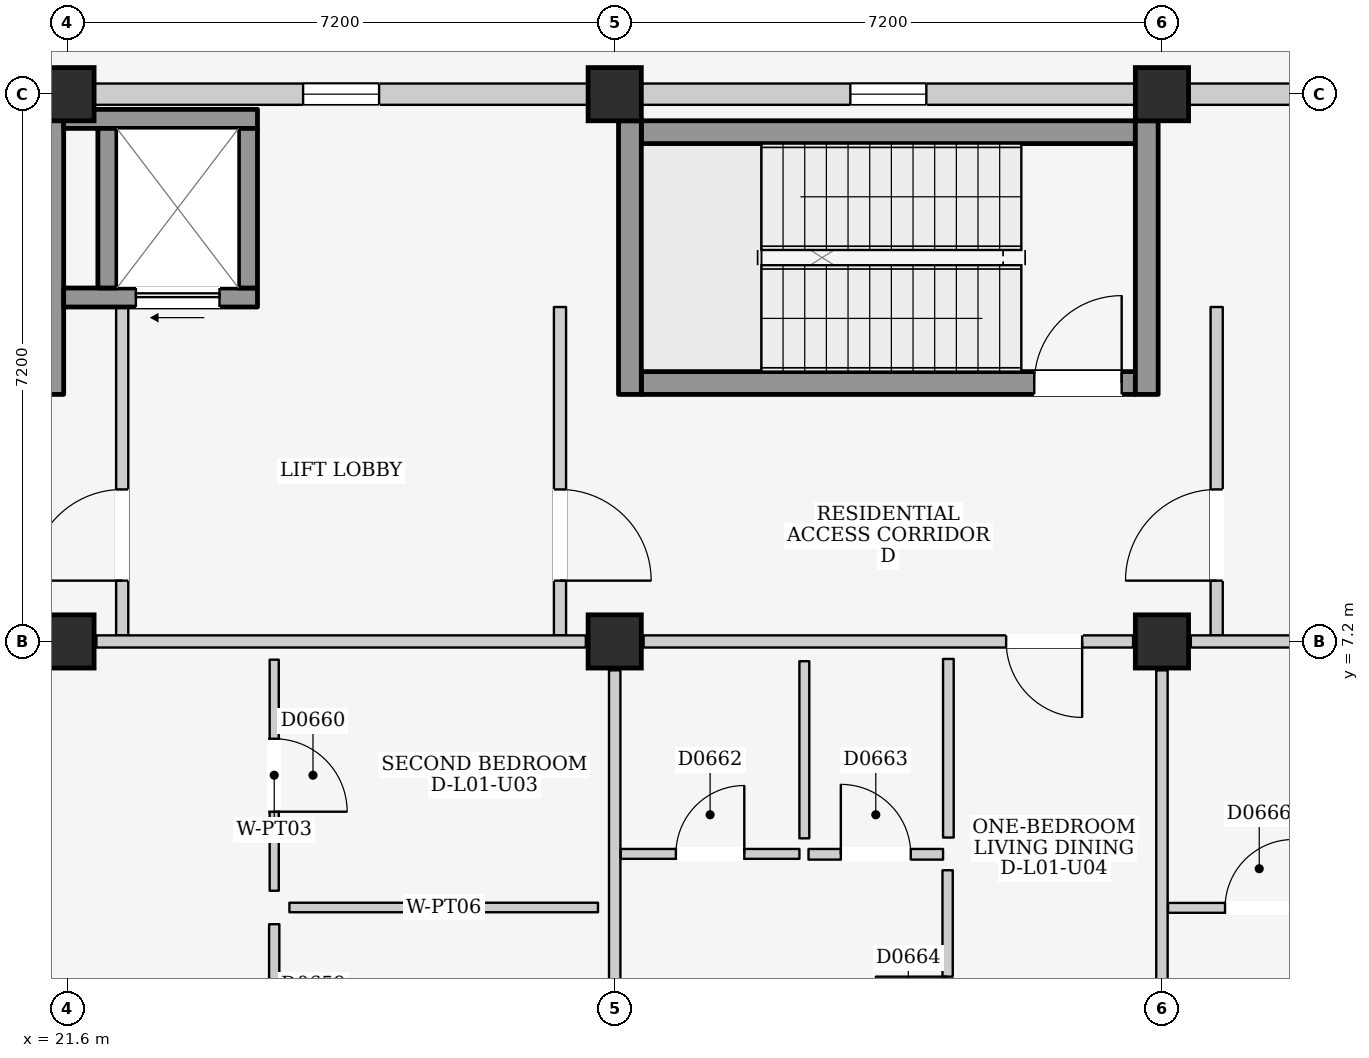
"""IFC4 building model, lengths in metres.
Left out: names, types, materials, properties, quantities, classifications, styles, units other than length and angle.
Written with IfcOpenShell. Run it as: python <this file> out.ifc"""

import sys

from ifc_helpers import new_model, si_unit, direction, frame, frame_2d, origin, origin_2d, place, context, subcontext, project, spatial, rectangle, extrude, element, fill, save


model = new_model("IFC4")
c1 = context("Model", 3, precision=1e-05, world=origin(), true_north=direction((0.0, 1.0)))
c2 = subcontext(c1, "Body", "Model", "MODEL_VIEW")
j1 = project(units=[si_unit("LENGTHUNIT", "METRE"), si_unit("PLANEANGLEUNIT", "RADIAN")], contexts=[c1])
p1 = place(None, origin())
s1 = spatial("IfcSite", under=j1, at=p1, CompositionType="ELEMENT")
p2 = place(p1, origin())
s2 = spatial("IfcBuilding", under=s1, at=p2, CompositionType="ELEMENT")
p3 = place(p2, frame((0.0, 0.0, 4.5)))
s3 = spatial("IfcBuildingStorey", under=s2, at=p3, CompositionType="ELEMENT", Elevation=4.5)
for number, where, z_axis, x_axis in (
    (1, (21.6, 7.2, 0.0), (0.0, 0.0, 1.0), (1.0, 0.0, 0.0)),
    (2, (21.6, 14.4, 0.0), (0.0, 0.0, 1.0), (1.0, 0.0, 0.0)),
    (3, (28.8, 7.2, 0.0), (0.0, 0.0, 1.0), (1.0, 0.0, 0.0)),
    (4, (28.8, 14.4, 0.0), (0.0, 0.0, 1.0), (1.0, 0.0, 0.0)),
    (5, (36.0, 7.2, 0.0), (0.0, 0.0, 1.0), (1.0, 0.0, 0.0)),
    (6, (36.0, 14.4, 0.0), (0.0, 0.0, 1.0), (1.0, 0.0, 0.0)),
):
    element("IfcColumn", number, at=place(p3, frame(where, z_axis=z_axis, x_axis=x_axis)), inside=s3, PredefinedType="COLUMN", context=c2, shape_type="SweptSolid", body=[
        extrude(rectangle(XDim=0.7, YDim=0.7, at=origin_2d()), origin(), (0.0, 0.0, 1.0), 4.5),
    ])
p4 = place(p3, frame((21.95, 14.4, 0.0), z_axis=(0.0, 0.0, 1.0), x_axis=(1.0, 0.0, 0.0)))
e7 = element("IfcWall", 7, at=p4, inside=s3, PredefinedType="ELEMENTEDWALL", context=c2, shape_type="SweptSolid", body=[
    extrude(rectangle(XDim=6.5, YDim=0.28, at=frame_2d((3.25, 0.0))), origin(), (0.0, 0.0, 1.0), 3.635),
])
p5 = place(p4, frame((2.75, 0.0, 1.2)))
e8 = element("IfcOpeningElement", 8, at=p5, cuts=e7, PredefinedType="OPENING", context=c2, shape_type="SweptSolid", body=[
    extrude(rectangle(XDim=1.0, YDim=0.9, at=frame_2d((0.5, 0.45))), frame((0.0, 0.155, 0.0), z_axis=(0.0, -1.0, 0.0), x_axis=(1.0, 0.0, 0.0)), (0.0, 0.0, 1.0), 0.31),
])
p6 = place(p3, frame((29.15, 14.4, 0.0), z_axis=(0.0, 0.0, 1.0), x_axis=(1.0, 0.0, 0.0)))
e9 = element("IfcWall", 9, at=p6, inside=s3, PredefinedType="ELEMENTEDWALL", context=c2, shape_type="SweptSolid", body=[
    extrude(rectangle(XDim=6.5, YDim=0.28, at=frame_2d((3.25, 0.0))), origin(), (0.0, 0.0, 1.0), 3.635),
])
p7 = place(p6, frame((2.75, 0.0, 1.2)))
e10 = element("IfcOpeningElement", 10, at=p7, cuts=e9, PredefinedType="OPENING", context=c2, shape_type="SweptSolid", body=[
    extrude(rectangle(XDim=1.0, YDim=0.9, at=frame_2d((0.5, 0.45))), frame((0.0, 0.155, 0.0), z_axis=(0.0, -1.0, 0.0), x_axis=(1.0, 0.0, 0.0)), (0.0, 0.0, 1.0), 0.31),
])
p8 = place(p3, frame((36.35, 14.4, 0.0), z_axis=(0.0, 0.0, 1.0), x_axis=(1.0, 0.0, 0.0)))
e11 = element("IfcWall", 11, at=p8, inside=s3, PredefinedType="ELEMENTEDWALL", context=c2, shape_type="SweptSolid", body=[
    extrude(rectangle(XDim=6.5, YDim=0.28, at=frame_2d((3.25, 0.0))), origin(), (0.0, 0.0, 1.0), 3.635),
])
p9 = place(p8, frame((2.75, 0.0, 1.2)))
e12 = element("IfcOpeningElement", 12, at=p9, cuts=e11, PredefinedType="OPENING", context=c2, shape_type="SweptSolid", body=[
    extrude(rectangle(XDim=1.0, YDim=0.9, at=frame_2d((0.5, 0.45))), frame((0.0, 0.155, 0.0), z_axis=(0.0, -1.0, 0.0), x_axis=(1.0, 0.0, 0.0)), (0.0, 0.0, 1.0), 0.31),
])
p10 = place(p3, frame((21.4, 10.45, 0.0), z_axis=(0.0, 0.0, 1.0), x_axis=(0.0, 1.0, 0.0)))
e13 = element("IfcWall", 13, at=p10, inside=s3, PredefinedType="SHEAR", context=c2, shape_type="SweptSolid", body=[
    extrude(rectangle(XDim=3.75, YDim=0.3, at=frame_2d((1.875, 0.0))), origin(), (0.0, 0.0, 1.0), 4.25),
])
p11 = place(p3, frame((22.32, 7.28, 0.0), z_axis=(0.0, 0.0, 1.0), x_axis=(0.0, 1.0, 0.0)))
e14 = element("IfcWall", 14, at=p11, inside=s3, PredefinedType="PARTITIONING", context=c2, shape_type="SweptSolid", body=[
    extrude(rectangle(XDim=4.32, YDim=0.16, at=frame_2d((2.16, 0.0))), origin(), (0.0, 0.0, 1.0), 4.25),
])
p12 = place(p11, frame((0.72, 0.0, 0.0)))
e15 = element("IfcOpeningElement", 15, at=p12, cuts=e14, PredefinedType="OPENING", context=c2, shape_type="SweptSolid", body=[
    extrude(rectangle(XDim=1.2, YDim=2.2, at=frame_2d((0.6, 1.1))), frame((0.0, 0.095, 0.0), z_axis=(0.0, -1.0, 0.0), x_axis=(1.0, 0.0, 0.0)), (0.0, 0.0, 1.0), 0.19),
])
p13 = place(p3, frame((28.08, 7.28, 0.0), z_axis=(0.0, 0.0, 1.0), x_axis=(0.0, 1.0, 0.0)))
e16 = element("IfcWall", 16, at=p13, inside=s3, PredefinedType="PARTITIONING", context=c2, shape_type="SweptSolid", body=[
    extrude(rectangle(XDim=4.32, YDim=0.16, at=frame_2d((2.16, 0.0))), origin(), (0.0, 0.0, 1.0), 4.25),
])
p14 = place(p13, frame((0.72, 0.0, 0.0)))
e17 = element("IfcOpeningElement", 17, at=p14, cuts=e16, PredefinedType="OPENING", context=c2, shape_type="SweptSolid", body=[
    extrude(rectangle(XDim=1.2, YDim=2.2, at=frame_2d((0.6, 1.1))), frame((0.0, 0.095, 0.0), z_axis=(0.0, -1.0, 0.0), x_axis=(1.0, 0.0, 0.0)), (0.0, 0.0, 1.0), 0.19),
])
p15 = place(p3, frame((21.55, 11.725, 0.0), z_axis=(0.0, 0.0, 1.0), x_axis=(1.0, 0.0, 0.0)))
e18 = element("IfcWall", 18, at=p15, inside=s3, PredefinedType="SHEAR", context=c2, shape_type="SweptSolid", body=[
    extrude(rectangle(XDim=2.55, YDim=0.25, at=frame_2d((1.275, 0.0))), origin(), (0.0, 0.0, 1.0), 4.25),
])
p16 = place(p15, frame((0.95, 0.0, 0.0)))
e19 = element("IfcOpeningElement", 19, at=p16, cuts=e18, PredefinedType="OPENING", context=c2, shape_type="SweptSolid", body=[
    extrude(rectangle(XDim=1.1, YDim=2.15, at=frame_2d((0.55, 1.075))), frame((0.0, 0.14, 0.0), z_axis=(0.0, -1.0, 0.0), x_axis=(1.0, 0.0, 0.0)), (0.0, 0.0, 1.0), 0.28),
])
p17 = place(p3, frame((21.55, 14.075, 0.0), z_axis=(0.0, 0.0, 1.0), x_axis=(1.0, 0.0, 0.0)))
e20 = element("IfcWall", 20, at=p17, inside=s3, PredefinedType="SHEAR", context=c2, shape_type="SweptSolid", body=[
    extrude(rectangle(XDim=2.55, YDim=0.25, at=frame_2d((1.275, 0.0))), origin(), (0.0, 0.0, 1.0), 4.25),
])
for number, where, z_axis, x_axis in (
    (21, (22.125, 11.85, 0.0), (0.0, 0.0, 1.0), (0.0, 1.0, 0.0)),
    (22, (23.975, 11.85, 0.0), (0.0, 0.0, 1.0), (0.0, 1.0, 0.0)),
):
    element("IfcWall", number, at=place(p3, frame(where, z_axis=z_axis, x_axis=x_axis)), inside=s3, PredefinedType="SHEAR", context=c2, shape_type="SweptSolid", body=[
        extrude(rectangle(XDim=2.1, YDim=0.25, at=frame_2d((1.05, 0.0))), origin(), (0.0, 0.0, 1.0), 4.25),
    ])
p18 = place(p3, frame((29.15, 10.6, 0.0), z_axis=(0.0, 0.0, 1.0), x_axis=(1.0, 0.0, 0.0)))
e23 = element("IfcWall", 23, at=p18, inside=s3, PredefinedType="SHEAR", context=c2, shape_type="SweptSolid", body=[
    extrude(rectangle(XDim=6.5, YDim=0.3, at=frame_2d((3.25, 0.0))), origin(), (0.0, 0.0, 1.0), 4.25),
])
p19 = place(p18, frame((5.17, 0.0, 0.0)))
e24 = element("IfcOpeningElement", 24, at=p19, cuts=e23, PredefinedType="OPENING", context=c2, shape_type="SweptSolid", body=[
    extrude(rectangle(XDim=1.15, YDim=2.2, at=frame_2d((0.575, 1.1))), frame((0.0, 0.165, 0.0), z_axis=(0.0, -1.0, 0.0), x_axis=(1.0, 0.0, 0.0)), (0.0, 0.0, 1.0), 0.33),
])
p20 = place(p3, frame((29.15, 13.9, 0.0), z_axis=(0.0, 0.0, 1.0), x_axis=(1.0, 0.0, 0.0)))
e25 = element("IfcWall", 25, at=p20, inside=s3, PredefinedType="SHEAR", context=c2, shape_type="SweptSolid", body=[
    extrude(rectangle(XDim=6.5, YDim=0.3, at=frame_2d((3.25, 0.0))), origin(), (0.0, 0.0, 1.0), 4.25),
])
for number, where, z_axis, x_axis in (
    (26, (29.0, 10.45, 0.0), (0.0, 0.0, 1.0), (0.0, 1.0, 0.0)),
    (27, (35.8, 10.45, 0.0), (0.0, 0.0, 1.0), (0.0, 1.0, 0.0)),
):
    element("IfcWall", number, at=place(p3, frame(where, z_axis=z_axis, x_axis=x_axis)), inside=s3, PredefinedType="SHEAR", context=c2, shape_type="SweptSolid", body=[
        extrude(rectangle(XDim=3.6, YDim=0.3, at=frame_2d((1.8, 0.0))), origin(), (0.0, 0.0, 1.0), 4.25),
    ])
p21 = place(p3, frame((36.72, 7.28, 0.0), z_axis=(0.0, 0.0, 1.0), x_axis=(0.0, 1.0, 0.0)))
e28 = element("IfcWall", 28, at=p21, inside=s3, PredefinedType="PARTITIONING", context=c2, shape_type="SweptSolid", body=[
    extrude(rectangle(XDim=4.32, YDim=0.16, at=frame_2d((2.16, 0.0))), origin(), (0.0, 0.0, 1.0), 4.25),
])
p22 = place(p21, frame((0.72, 0.0, 0.0)))
e29 = element("IfcOpeningElement", 29, at=p22, cuts=e28, PredefinedType="OPENING", context=c2, shape_type="SweptSolid", body=[
    extrude(rectangle(XDim=1.2, YDim=2.2, at=frame_2d((0.6, 1.1))), frame((0.0, 0.095, 0.0), z_axis=(0.0, -1.0, 0.0), x_axis=(1.0, 0.0, 0.0)), (0.0, 0.0, 1.0), 0.19),
])
p23 = place(p3, frame((21.98, 7.2, 0.0), z_axis=(0.0, 0.0, 1.0), x_axis=(1.0, 0.0, 0.0)))
e30 = element("IfcWall", 30, at=p23, inside=s3, PredefinedType="PARTITIONING", context=c2, shape_type="SweptSolid", body=[
    extrude(rectangle(XDim=6.44, YDim=0.16, at=frame_2d((3.22, 0.0))), origin(), (0.0, 0.0, 1.0), 3.635),
])
p24 = place(p3, frame((28.8, 0.38, 0.0), z_axis=(0.0, 0.0, 1.0), x_axis=(0.0, 1.0, 0.0)))
e31 = element("IfcWall", 31, at=p24, inside=s3, PredefinedType="PARTITIONING", context=c2, shape_type="SweptSolid", body=[
    extrude(rectangle(XDim=6.44, YDim=0.15, at=frame_2d((3.22, 0.0))), origin(), (0.0, 0.0, 1.0), 3.685),
])
p25 = place(p3, frame((24.32, 0.44, 0.0), z_axis=(0.0, 0.0, 1.0), x_axis=(0.0, 1.0, 0.0)))
e32 = element("IfcWall", 32, at=p25, inside=s3, PredefinedType="PARTITIONING", context=c2, shape_type="SweptSolid", body=[
    extrude(rectangle(XDim=3.04, YDim=0.135, at=frame_2d((1.52, 0.0))), origin(), (0.0, 0.0, 1.0), 4.25),
])
p26 = place(p25, frame((1.045, 0.0, 0.0)))
e33 = element("IfcOpeningElement", 33, at=p26, cuts=e32, PredefinedType="OPENING", context=c2, shape_type="SweptSolid", body=[
    extrude(rectangle(XDim=0.95, YDim=2.15, at=frame_2d((0.475, 1.075))), frame((0.0, 0.083, 0.0), z_axis=(0.0, -1.0, 0.0), x_axis=(1.0, 0.0, 0.0)), (0.0, 0.0, 1.0), 0.165),
])
p27 = place(p3, frame((24.52, 3.7, 0.0), z_axis=(0.0, 0.0, 1.0), x_axis=(1.0, 0.0, 0.0)))
e34 = element("IfcWall", 34, at=p27, inside=s3, PredefinedType="PARTITIONING", context=c2, shape_type="SweptSolid", body=[
    extrude(rectangle(XDim=4.06, YDim=0.125, at=frame_2d((2.03, 0.0))), origin(), (0.0, 0.0, 1.0), 4.25),
])
p28 = place(p3, frame((24.32, 3.92, 0.0), z_axis=(0.0, 0.0, 1.0), x_axis=(0.0, 1.0, 0.0)))
e35 = element("IfcWall", 35, at=p28, inside=s3, PredefinedType="PARTITIONING", context=c2, shape_type="SweptSolid", body=[
    extrude(rectangle(XDim=3.04, YDim=0.12, at=frame_2d((1.52, 0.0))), origin(), (0.0, 0.0, 1.0), 4.25),
])
p29 = place(p28, frame((1.04, 0.0, 0.0)))
e36 = element("IfcOpeningElement", 36, at=p29, cuts=e35, PredefinedType="OPENING", context=c2, shape_type="SweptSolid", body=[
    extrude(rectangle(XDim=0.96, YDim=2.15, at=frame_2d((0.48, 1.075))), frame((0.0, 0.075, 0.0), z_axis=(0.0, -1.0, 0.0), x_axis=(1.0, 0.0, 0.0)), (0.0, 0.0, 1.0), 0.15),
])
p30 = place(p3, frame((29.18, 7.2, 0.0), z_axis=(0.0, 0.0, 1.0), x_axis=(1.0, 0.0, 0.0)))
e37 = element("IfcWall", 37, at=p30, inside=s3, PredefinedType="PARTITIONING", context=c2, shape_type="SweptSolid", body=[
    extrude(rectangle(XDim=6.44, YDim=0.16, at=frame_2d((3.22, 0.0))), origin(), (0.0, 0.0, 1.0), 3.635),
])
p31 = place(p30, frame((4.77, 0.0, 0.0)))
e38 = element("IfcOpeningElement", 38, at=p31, cuts=e37, PredefinedType="OPENING", context=c2, shape_type="SweptSolid", body=[
    extrude(rectangle(XDim=1.0, YDim=2.15, at=frame_2d((0.5, 1.075))), frame((0.0, 0.095, 0.0), z_axis=(0.0, -1.0, 0.0), x_axis=(1.0, 0.0, 0.0)), (0.0, 0.0, 1.0), 0.19),
])
p32 = place(p3, frame((36.0, 0.38, 0.0), z_axis=(0.0, 0.0, 1.0), x_axis=(0.0, 1.0, 0.0)))
e39 = element("IfcWall", 39, at=p32, inside=s3, PredefinedType="PARTITIONING", context=c2, shape_type="SweptSolid", body=[
    extrude(rectangle(XDim=6.44, YDim=0.15, at=frame_2d((3.22, 0.0))), origin(), (0.0, 0.0, 1.0), 3.685),
])
p33 = place(p3, frame((28.88, 4.405, 0.0), z_axis=(0.0, 0.0, 1.0), x_axis=(1.0, 0.0, 0.0)))
e40 = element("IfcWall", 40, at=p33, inside=s3, PredefinedType="PARTITIONING", context=c2, shape_type="SweptSolid", body=[
    extrude(rectangle(XDim=2.35, YDim=0.13, at=frame_2d((1.175, 0.0))), origin(), (0.0, 0.0, 1.0), 4.25),
])
p34 = place(p33, frame((0.725, 0.0, 0.0)))
e41 = element("IfcOpeningElement", 41, at=p34, cuts=e40, PredefinedType="OPENING", context=c2, shape_type="SweptSolid", body=[
    extrude(rectangle(XDim=0.9, YDim=2.1, at=frame_2d((0.45, 1.05))), frame((0.0, 0.08, 0.0), z_axis=(0.0, -1.0, 0.0), x_axis=(1.0, 0.0, 0.0)), (0.0, 0.0, 1.0), 0.16),
])
p35 = place(p3, frame((31.295, 4.61, 0.0), z_axis=(0.0, 0.0, 1.0), x_axis=(0.0, 1.0, 0.0)))
e42 = element("IfcWall", 42, at=p35, inside=s3, PredefinedType="PARTITIONING", context=c2, shape_type="SweptSolid", body=[
    extrude(rectangle(XDim=2.33, YDim=0.13, at=frame_2d((1.165, 0.0))), origin(), (0.0, 0.0, 1.0), 4.25),
])
p36 = place(p3, frame((31.35, 4.4, 0.0), z_axis=(0.0, 0.0, 1.0), x_axis=(1.0, 0.0, 0.0)))
e43 = element("IfcWall", 43, at=p36, inside=s3, PredefinedType="PARTITIONING", context=c2, shape_type="SweptSolid", body=[
    extrude(rectangle(XDim=1.77, YDim=0.14, at=frame_2d((0.885, 0.0))), origin(), (0.0, 0.0, 1.0), 4.25),
])
p37 = place(p36, frame((0.425, 0.0, 0.0)))
e44 = element("IfcOpeningElement", 44, at=p37, cuts=e43, PredefinedType="OPENING", context=c2, shape_type="SweptSolid", body=[
    extrude(rectangle(XDim=0.92, YDim=2.1, at=frame_2d((0.46, 1.05))), frame((0.0, 0.085, 0.0), z_axis=(0.0, -1.0, 0.0), x_axis=(1.0, 0.0, 0.0)), (0.0, 0.0, 1.0), 0.17),
])
p38 = place(p3, frame((33.19, 4.62, 0.0), z_axis=(0.0, 0.0, 1.0), x_axis=(0.0, 1.0, 0.0)))
e45 = element("IfcWall", 45, at=p38, inside=s3, PredefinedType="PARTITIONING", context=c2, shape_type="SweptSolid", body=[
    extrude(rectangle(XDim=2.35, YDim=0.14, at=frame_2d((1.175, 0.0))), origin(), (0.0, 0.0, 1.0), 4.25),
])
p39 = place(p3, frame((33.18, 0.44, 0.0), z_axis=(0.0, 0.0, 1.0), x_axis=(0.0, 1.0, 0.0)))
e46 = element("IfcWall", 46, at=p39, inside=s3, PredefinedType="PARTITIONING", context=c2, shape_type="SweptSolid", body=[
    extrude(rectangle(XDim=3.75, YDim=0.135, at=frame_2d((1.875, 0.0))), origin(), (0.0, 0.0, 1.0), 4.25),
])
p40 = place(p39, frame((1.4, 0.0, 0.0)))
e47 = element("IfcOpeningElement", 47, at=p40, cuts=e46, PredefinedType="OPENING", context=c2, shape_type="SweptSolid", body=[
    extrude(rectangle(XDim=0.95, YDim=2.15, at=frame_2d((0.475, 1.075))), frame((0.0, 0.083, 0.0), z_axis=(0.0, -1.0, 0.0), x_axis=(1.0, 0.0, 0.0)), (0.0, 0.0, 1.0), 0.165),
])
p41 = place(p3, frame((36.38, 7.2, 0.0), z_axis=(0.0, 0.0, 1.0), x_axis=(1.0, 0.0, 0.0)))
e48 = element("IfcWall", 48, at=p41, inside=s3, PredefinedType="PARTITIONING", context=c2, shape_type="SweptSolid", body=[
    extrude(rectangle(XDim=6.44, YDim=0.16, at=frame_2d((3.22, 0.0))), origin(), (0.0, 0.0, 1.0), 3.635),
])
p42 = place(p3, frame((36.08, 3.695, 0.0), z_axis=(0.0, 0.0, 1.0), x_axis=(1.0, 0.0, 0.0)))
e49 = element("IfcWall", 49, at=p42, inside=s3, PredefinedType="PARTITIONING", context=c2, shape_type="SweptSolid", body=[
    extrude(rectangle(XDim=2.4, YDim=0.13, at=frame_2d((1.2, 0.0))), origin(), (0.0, 0.0, 1.0), 4.25),
])
p43 = place(p42, frame((0.75, 0.0, 0.0)))
e50 = element("IfcOpeningElement", 50, at=p43, cuts=e49, PredefinedType="OPENING", context=c2, shape_type="SweptSolid", body=[
    extrude(rectangle(XDim=0.9, YDim=2.1, at=frame_2d((0.45, 1.05))), frame((0.0, 0.08, 0.0), z_axis=(0.0, -1.0, 0.0), x_axis=(1.0, 0.0, 0.0)), (0.0, 0.0, 1.0), 0.16),
])
p44 = place(p5, origin())
e51 = element("IfcWindow", 51, at=p44, inside=s3, PartitioningType="SINGLE_PANEL", PredefinedType="WINDOW", context=c2, shape_type="SweptSolid", body=[
    extrude(rectangle(XDim=1.0, YDim=0.9, at=frame_2d((0.5, 0.45))), frame((0.0, 0.03, 0.0), z_axis=(0.0, -1.0, 0.0), x_axis=(1.0, 0.0, 0.0)), (0.0, 0.0, 1.0), 0.06),
])
fill(e8, e51)
p45 = place(p7, origin())
e52 = element("IfcWindow", 52, at=p45, inside=s3, PartitioningType="SINGLE_PANEL", PredefinedType="WINDOW", context=c2, shape_type="SweptSolid", body=[
    extrude(rectangle(XDim=1.0, YDim=0.9, at=frame_2d((0.5, 0.45))), frame((0.0, 0.03, 0.0), z_axis=(0.0, -1.0, 0.0), x_axis=(1.0, 0.0, 0.0)), (0.0, 0.0, 1.0), 0.06),
])
fill(e10, e52)
p46 = place(p12, origin())
e53 = element("IfcDoor", 53, at=p46, inside=s3, OperationType="SINGLE_SWING_LEFT", PredefinedType="DOOR", context=c2, shape_type="SweptSolid", body=[
    extrude(rectangle(XDim=1.2, YDim=2.2, at=frame_2d((0.6, 1.1))), frame((0.0, 0.025, 0.0), z_axis=(0.0, -1.0, 0.0), x_axis=(1.0, 0.0, 0.0)), (0.0, 0.0, 1.0), 0.05),
])
fill(e15, e53)
p47 = place(p14, frame((1.2, 0.0, 0.0), z_axis=(0.0, 0.0, 1.0), x_axis=(-1.0, 0.0, 0.0)))
e54 = element("IfcDoor", 54, at=p47, inside=s3, OperationType="SINGLE_SWING_RIGHT", PredefinedType="DOOR", context=c2, shape_type="SweptSolid", body=[
    extrude(rectangle(XDim=1.2, YDim=2.2, at=frame_2d((0.6, 1.1))), frame((0.0, 0.025, 0.0), z_axis=(0.0, -1.0, 0.0), x_axis=(1.0, 0.0, 0.0)), (0.0, 0.0, 1.0), 0.05),
])
fill(e17, e54)
p48 = place(p16, frame((1.1, 0.0, 0.0), z_axis=(0.0, 0.0, 1.0), x_axis=(-1.0, 0.0, 0.0)))
e55 = element("IfcDoor", 55, at=p48, inside=s3, OperationType="SLIDING_TO_LEFT", PredefinedType="DOOR", context=c2, shape_type="SweptSolid", body=[
    extrude(rectangle(XDim=1.1, YDim=2.15, at=frame_2d((0.55, 1.075))), frame((0.0, 0.025, 0.0), z_axis=(0.0, -1.0, 0.0), x_axis=(1.0, 0.0, 0.0)), (0.0, 0.0, 1.0), 0.05),
])
fill(e19, e55)
p49 = place(p19, origin())
e56 = element("IfcDoor", 56, at=p49, inside=s3, OperationType="SINGLE_SWING_RIGHT", PredefinedType="DOOR", context=c2, shape_type="SweptSolid", body=[
    extrude(rectangle(XDim=1.15, YDim=2.2, at=frame_2d((0.575, 1.1))), frame((0.0, 0.025, 0.0), z_axis=(0.0, -1.0, 0.0), x_axis=(1.0, 0.0, 0.0)), (0.0, 0.0, 1.0), 0.05),
])
fill(e24, e56)
p50 = place(p22, origin())
e57 = element("IfcDoor", 57, at=p50, inside=s3, OperationType="SINGLE_SWING_LEFT", PredefinedType="DOOR", context=c2, shape_type="SweptSolid", body=[
    extrude(rectangle(XDim=1.2, YDim=2.2, at=frame_2d((0.6, 1.1))), frame((0.0, 0.025, 0.0), z_axis=(0.0, -1.0, 0.0), x_axis=(1.0, 0.0, 0.0)), (0.0, 0.0, 1.0), 0.05),
])
fill(e29, e57)
p51 = place(p29, frame((0.96, 0.0, 0.0), z_axis=(0.0, 0.0, 1.0), x_axis=(-1.0, 0.0, 0.0)))
e58 = element("IfcDoor", 58, at=p51, inside=s3, OperationType="SINGLE_SWING_RIGHT", PredefinedType="DOOR", context=c2, shape_type="SweptSolid", body=[
    extrude(rectangle(XDim=0.96, YDim=2.15, at=frame_2d((0.48, 1.075))), frame((0.0, 0.025, 0.0), z_axis=(0.0, -1.0, 0.0), x_axis=(1.0, 0.0, 0.0)), (0.0, 0.0, 1.0), 0.05),
])
fill(e36, e58)
p52 = place(p31, frame((1.0, 0.0, 0.0), z_axis=(0.0, 0.0, 1.0), x_axis=(-1.0, 0.0, 0.0)))
e59 = element("IfcDoor", 59, at=p52, inside=s3, OperationType="SINGLE_SWING_LEFT", PredefinedType="DOOR", context=c2, shape_type="SweptSolid", body=[
    extrude(rectangle(XDim=1.0, YDim=2.15, at=frame_2d((0.5, 1.075))), frame((0.0, 0.025, 0.0), z_axis=(0.0, -1.0, 0.0), x_axis=(1.0, 0.0, 0.0)), (0.0, 0.0, 1.0), 0.05),
])
fill(e38, e59)
p53 = place(p34, origin())
e60 = element("IfcDoor", 60, at=p53, inside=s3, OperationType="SINGLE_SWING_RIGHT", PredefinedType="DOOR", context=c2, shape_type="SweptSolid", body=[
    extrude(rectangle(XDim=0.9, YDim=2.1, at=frame_2d((0.45, 1.05))), frame((0.0, 0.025, 0.0), z_axis=(0.0, -1.0, 0.0), x_axis=(1.0, 0.0, 0.0)), (0.0, 0.0, 1.0), 0.05),
])
fill(e41, e60)
p54 = place(p37, origin())
e61 = element("IfcDoor", 61, at=p54, inside=s3, OperationType="SINGLE_SWING_LEFT", PredefinedType="DOOR", context=c2, shape_type="SweptSolid", body=[
    extrude(rectangle(XDim=0.92, YDim=2.1, at=frame_2d((0.46, 1.05))), frame((0.0, 0.025, 0.0), z_axis=(0.0, -1.0, 0.0), x_axis=(1.0, 0.0, 0.0)), (0.0, 0.0, 1.0), 0.05),
])
fill(e44, e61)
p55 = place(p40, origin())
e62 = element("IfcDoor", 62, at=p55, inside=s3, OperationType="SINGLE_SWING_RIGHT", PredefinedType="DOOR", context=c2, shape_type="SweptSolid", body=[
    extrude(rectangle(XDim=0.95, YDim=2.15, at=frame_2d((0.475, 1.075))), frame((0.0, 0.025, 0.0), z_axis=(0.0, -1.0, 0.0), x_axis=(1.0, 0.0, 0.0)), (0.0, 0.0, 1.0), 0.05),
])
fill(e47, e62)
p56 = place(p43, origin())
e63 = element("IfcDoor", 63, at=p56, inside=s3, OperationType="SINGLE_SWING_RIGHT", PredefinedType="DOOR", context=c2, shape_type="SweptSolid", body=[
    extrude(rectangle(XDim=0.9, YDim=2.1, at=frame_2d((0.45, 1.05))), frame((0.0, 0.025, 0.0), z_axis=(0.0, -1.0, 0.0), x_axis=(1.0, 0.0, 0.0)), (0.0, 0.0, 1.0), 0.05),
])
fill(e50, e63)
save(model, sys.argv[1])
